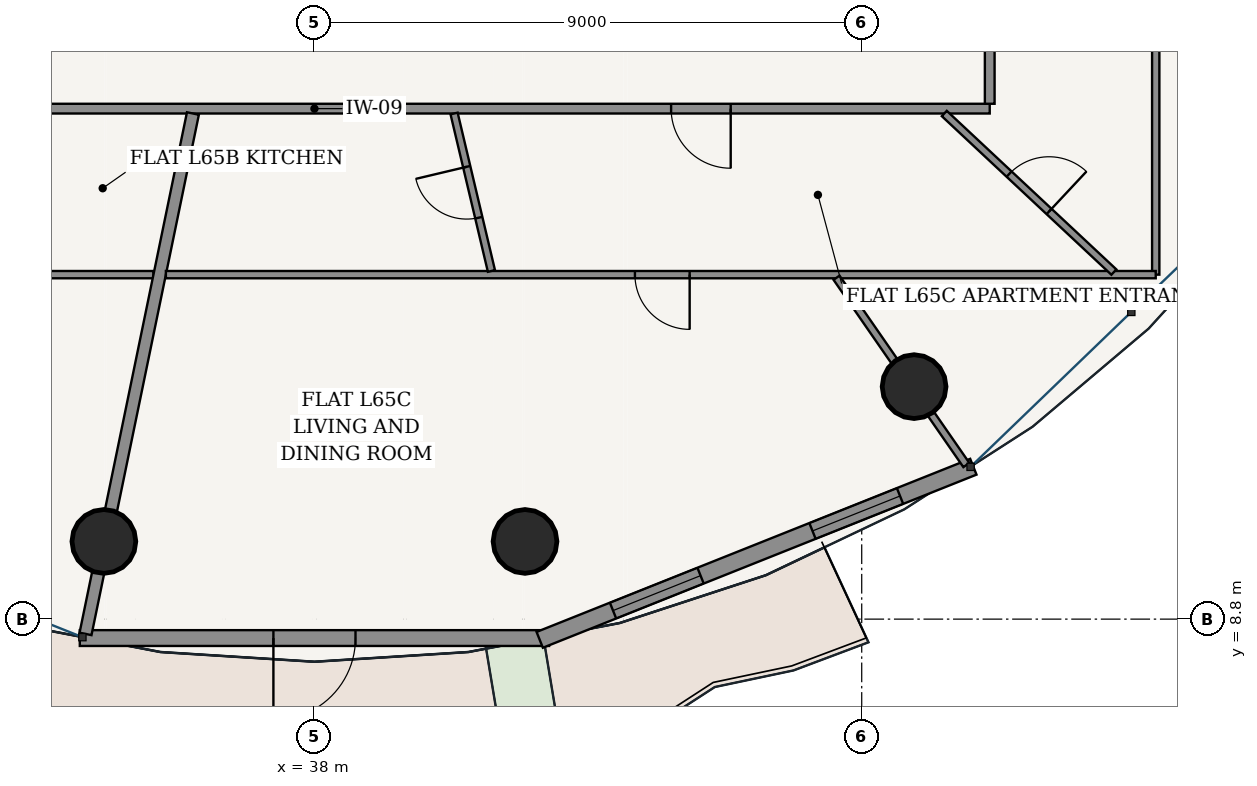
"""IFC4 building model, lengths in metres.
Left out: names, types, materials, properties, quantities, classifications, styles, units other than length and angle.
Written with IfcOpenShell. Run it as: python <this file> out.ifc"""

import sys

from ifc_helpers import new_model, si_unit, direction, frame, frame_2d, origin, origin_2d, place, context, subcontext, project, spatial, rectangle, hollow_circle, extrude, source, transform, mapped, element, fill, save


model = new_model("IFC4")
c1 = context("Model", 3, precision=1e-05, world=origin(), true_north=direction((-0.2419218956, 0.970295726276)))
c2 = subcontext(c1, "Body", "Model", "MODEL_VIEW")
j1 = project(units=[si_unit("LENGTHUNIT", "METRE"), si_unit("PLANEANGLEUNIT", "RADIAN")], contexts=[c1])
p1 = place(None, origin())
s1 = spatial("IfcSite", under=j1, at=p1, CompositionType="ELEMENT")
p2 = place(p1, origin())
s2 = spatial("IfcBuilding", under=s1, at=p2, CompositionType="ELEMENT")
p3 = place(p2, frame((0.0, 0.0, 248.2)))
s3 = spatial("IfcBuildingStorey", under=s2, at=p3, CompositionType="ELEMENT", Elevation=248.2)
for number, where, z_axis, x_axis in (
    (1, (34.537, 10.078, 0.0), (0.0, 0.0, 1.0), (1.0, 0.0, 0.0)),
    (2, (41.463, 10.078, 0.0), (0.0, 0.0, 1.0), (1.0, 0.0, 0.0)),
    (3, (47.861, 12.624, 0.0), (0.0, 0.0, 1.0), (1.0, 0.0, 0.0)),
):
    element("IfcColumn", number, at=place(p3, frame(where, z_axis=z_axis, x_axis=x_axis)), inside=s3, PredefinedType="COLUMN", context=c2, shape_type="SweptSolid", body=[
        extrude(hollow_circle(Radius=0.525, WallThickness=0.035, at=origin_2d()), origin(), (0.0, 0.0, 1.0), 3.75),
    ])
p4 = place(p3, frame((34.141, 8.489, 0.0), z_axis=(0.0, 0.0, 1.0), x_axis=(1.0, 0.0, 0.0)))
e4 = element("IfcWall", 4, at=p4, inside=s3, PredefinedType="SOLIDWALL", context=c2, shape_type="SweptSolid", body=[
    extrude(rectangle(XDim=7.718, YDim=0.26, at=frame_2d((3.859, 0.0))), origin(), (0.0, 0.0, 1.0), 3.49),
])
p5 = place(p4, frame((3.184, 0.0, 0.0)))
e5 = element("IfcOpeningElement", 5, at=p5, cuts=e4, PredefinedType="OPENING", context=c2, shape_type="SweptSolid", body=[
    extrude(rectangle(XDim=1.35, YDim=2.2, at=frame_2d((0.675, 1.1))), frame((0.0, 0.14, 0.0), z_axis=(0.0, -1.0, 0.0), x_axis=(1.0, 0.0, 0.0)), (0.0, 0.0, 1.0), 0.28),
])
p6 = place(p3, frame((41.705, 8.459, 0.0), z_axis=(0.0, 0.0, 1.0), x_axis=(0.92871332341, 0.370798547626, 0.0)))
e6 = element("IfcWall", 6, at=p6, inside=s3, PredefinedType="SOLIDWALL", context=c2, shape_type="SweptSolid", body=[
    extrude(rectangle(XDim=7.678, YDim=0.28, at=frame_2d((3.839, 0.0))), origin(), (0.0, 0.0, 1.0), 3.49),
])
p7 = place(p6, frame((1.298, 0.0, 0.85)))
e7 = element("IfcOpeningElement", 7, at=p7, cuts=e6, PredefinedType="OPENING", context=c2, shape_type="SweptSolid", body=[
    extrude(rectangle(XDim=1.55, YDim=1.95, at=frame_2d((0.775, 0.975))), frame((0.0, 0.15, 0.0), z_axis=(0.0, -1.0, 0.0), x_axis=(1.0, 0.0, 0.0)), (0.0, 0.0, 1.0), 0.3),
])
p8 = place(p6, frame((4.83, 0.0, 0.85)))
e8 = element("IfcOpeningElement", 8, at=p8, cuts=e6, PredefinedType="OPENING", context=c2, shape_type="SweptSolid", body=[
    extrude(rectangle(XDim=1.55, YDim=1.95, at=frame_2d((0.775, 0.975))), frame((0.0, 0.15, 0.0), z_axis=(0.0, -1.0, 0.0), x_axis=(1.0, 0.0, 0.0)), (0.0, 0.0, 1.0), 0.3),
])
p9 = place(p3, frame((26.895, 17.195, 0.0), z_axis=(0.0, 0.0, 1.0), x_axis=(1.0, 0.0, 0.0)))
e9 = element("IfcWall", 9, at=p9, inside=s3, PredefinedType="PARTITIONING", context=c2, shape_type="SweptSolid", body=[
    extrude(rectangle(XDim=22.21, YDim=0.16, at=frame_2d((11.105, 0.0))), origin(), (0.0, 0.0, 1.0), 3.015),
])
p10 = place(p9, frame((2.861, 0.0, 0.0)))
e10 = element("IfcOpeningElement", 10, at=p10, cuts=e9, PredefinedType="OPENING", context=c2, shape_type="SweptSolid", body=[
    extrude(rectangle(XDim=0.98, YDim=2.2, at=frame_2d((0.49, 1.1))), frame((0.0, 0.09, 0.0), z_axis=(0.0, -1.0, 0.0), x_axis=(1.0, 0.0, 0.0)), (0.0, 0.0, 1.0), 0.18),
])
p11 = place(p9, frame((16.97, 0.0, 0.0)))
e11 = element("IfcOpeningElement", 11, at=p11, cuts=e9, PredefinedType="OPENING", context=c2, shape_type="SweptSolid", body=[
    extrude(rectangle(XDim=0.98, YDim=2.2, at=frame_2d((0.49, 1.1))), frame((0.0, 0.09, 0.0), z_axis=(0.0, -1.0, 0.0), x_axis=(1.0, 0.0, 0.0)), (0.0, 0.0, 1.0), 0.18),
])
p12 = place(p3, frame((49.105, 17.275, 0.0), z_axis=(0.0, 0.0, 1.0), x_axis=(0.0, 1.0, 0.0)))
e12 = element("IfcWall", 12, at=p12, inside=s3, PredefinedType="PARTITIONING", context=c2, shape_type="SweptSolid", body=[
    extrude(rectangle(XDim=13.925, YDim=0.16, at=frame_2d((6.962, 0.0))), origin(), (0.0, 0.0, 1.0), 3.015),
])
p13 = place(p3, frame((35.353, 14.465, 0.0), z_axis=(0.0, 0.0, 1.0), x_axis=(-1.0, 0.0, 0.0)))
e13 = element("IfcWall", 13, at=p13, inside=s3, PredefinedType="PARTITIONING", context=c2, shape_type="SweptSolid", body=[
    extrude(rectangle(XDim=11.188, YDim=0.12, at=frame_2d((5.594, 0.0))), origin(), (0.0, 0.0, 1.0), 3.015),
])
p14 = place(p13, frame((2.049, 0.0, 0.0)))
e14 = element("IfcOpeningElement", 14, at=p14, cuts=e13, PredefinedType="OPENING", context=c2, shape_type="SweptSolid", body=[
    extrude(rectangle(XDim=0.9, YDim=2.15, at=frame_2d((0.45, 1.075))), frame((0.0, 0.07, 0.0), z_axis=(0.0, -1.0, 0.0), x_axis=(1.0, 0.0, 0.0)), (0.0, 0.0, 1.0), 0.14),
])
p15 = place(p3, frame((36.001, 17.115, 0.0), z_axis=(0.0, 0.0, 1.0), x_axis=(-0.202108543081, -0.979363128167, 0.0)))
e15 = element("IfcWall", 15, at=p15, inside=s3, PredefinedType="PARTITIONING", context=c2, shape_type="SweptSolid", body=[
    extrude(rectangle(XDim=8.739, YDim=0.2, at=frame_2d((4.369, 0.0))), origin(), (0.0, 0.0, 1.0), 3.015),
])
p16 = place(p3, frame((51.835, 21.174, 0.0), z_axis=(0.0, 0.0, 1.0), x_axis=(0.0, -1.0, 0.0)))
e16 = element("IfcWall", 16, at=p16, inside=s3, PredefinedType="PARTITIONING", context=c2, shape_type="SweptSolid", body=[
    extrude(rectangle(XDim=6.709, YDim=0.12, at=frame_2d((3.354, 0.0))), origin(), (0.0, 0.0, 1.0), 3.015),
])
p17 = place(p16, frame((1.888, 0.0, 0.0)))
e17 = element("IfcOpeningElement", 17, at=p17, cuts=e16, PredefinedType="OPENING", context=c2, shape_type="SweptSolid", body=[
    extrude(rectangle(XDim=0.9, YDim=2.15, at=frame_2d((0.45, 1.075))), frame((0.0, 0.07, 0.0), z_axis=(0.0, -1.0, 0.0), x_axis=(1.0, 0.0, 0.0)), (0.0, 0.0, 1.0), 0.14),
])
p18 = place(p3, frame((51.835, 14.465, 0.0), z_axis=(0.0, 0.0, 1.0), x_axis=(-1.0, 0.0, 0.0)))
e18 = element("IfcWall", 18, at=p18, inside=s3, PredefinedType="PARTITIONING", context=c2, shape_type="SweptSolid", body=[
    extrude(rectangle(XDim=16.278, YDim=0.12, at=frame_2d((8.139, 0.0))), origin(), (0.0, 0.0, 1.0), 3.015),
])
p19 = place(p18, frame((7.665, 0.0, 0.0)))
e19 = element("IfcOpeningElement", 19, at=p19, cuts=e18, PredefinedType="OPENING", context=c2, shape_type="SweptSolid", body=[
    extrude(rectangle(XDim=0.9, YDim=2.15, at=frame_2d((0.45, 1.075))), frame((0.0, 0.07, 0.0), z_axis=(0.0, -1.0, 0.0), x_axis=(1.0, 0.0, 0.0)), (0.0, 0.0, 1.0), 0.14),
])
p20 = place(p3, frame((46.586, 14.414, 0.0), z_axis=(0.0, 0.0, 1.0), x_axis=(0.569657021681, -0.821882520589, 0.0)))
e20 = element("IfcWall", 20, at=p20, inside=s3, PredefinedType="PARTITIONING", context=c2, shape_type="SweptSolid", body=[
    extrude(rectangle(XDim=3.748, YDim=0.12, at=frame_2d((1.874, 0.0))), origin(), (0.0, 0.0, 1.0), 3.015),
])
p21 = place(p3, frame((40.296, 17.115, 0.0), z_axis=(0.0, 0.0, 1.0), x_axis=(0.230710960444, -0.973022328999, 0.0)))
e21 = element("IfcWall", 21, at=p21, inside=s3, PredefinedType="PARTITIONING", context=c2, shape_type="SweptSolid", body=[
    extrude(rectangle(XDim=2.661, YDim=0.12, at=frame_2d((1.331, 0.0))), origin(), (0.0, 0.0, 1.0), 3.49),
])
p22 = place(p21, frame((0.901, 0.0, 0.0)))
e22 = element("IfcOpeningElement", 22, at=p22, cuts=e21, PredefinedType="OPENING", context=c2, shape_type="SweptSolid", body=[
    extrude(rectangle(XDim=0.86, YDim=2.15, at=frame_2d((0.43, 1.075))), frame((0.0, 0.07, 0.0), z_axis=(0.0, -1.0, 0.0), x_axis=(1.0, 0.0, 0.0)), (0.0, 0.0, 1.0), 0.14),
])
p23 = place(p3, frame((48.358, 17.115, 0.0), z_axis=(0.0, 0.0, 1.0), x_axis=(0.730431927487, -0.682985504464, 0.0)))
e23 = element("IfcWall", 23, at=p23, inside=s3, PredefinedType="PARTITIONING", context=c2, shape_type="SweptSolid", body=[
    extrude(rectangle(XDim=3.818, YDim=0.12, at=frame_2d((1.909, 0.0))), origin(), (0.0, 0.0, 1.0), 3.121),
])
p24 = place(p23, frame((1.459, 0.0, 0.0)))
e24 = element("IfcOpeningElement", 24, at=p24, cuts=e23, PredefinedType="OPENING", context=c2, shape_type="SweptSolid", body=[
    extrude(rectangle(XDim=0.9, YDim=2.15, at=frame_2d((0.45, 1.075))), frame((0.0, 0.07, 0.0), z_axis=(0.0, -1.0, 0.0), x_axis=(1.0, 0.0, 0.0)), (0.0, 0.0, 1.0), 0.14),
])
m1 = source(origin(), c2, "Body", "SweptSolid", [
    extrude(rectangle(XDim=1.35, YDim=2.2, at=frame_2d((0.675, 1.1))), frame((0.0, 0.025, 0.0), z_axis=(0.0, -1.0, 0.0), x_axis=(1.0, 0.0, 0.0)), (0.0, 0.0, 1.0), 0.05),
])
p25 = place(p5, frame((1.35, 0.0, 0.0), z_axis=(0.0, 0.0, 1.0), x_axis=(-1.0, 0.0, 0.0)))
e25 = element("IfcDoor", 25, at=p25, inside=s3, OperationType="SINGLE_SWING_RIGHT", PredefinedType="DOOR", context=c2, shape_type="MappedRepresentation", body=[
    mapped(m1, transform((0.0, 0.0, 0.0), scale=1.0)),
])
fill(e5, e25)
m2 = source(origin(), c2, "Body", "SweptSolid", [
    extrude(rectangle(XDim=1.55, YDim=1.95, at=frame_2d((0.775, 0.975))), frame((0.0, 0.03, 0.0), z_axis=(0.0, -1.0, 0.0), x_axis=(1.0, 0.0, 0.0)), (0.0, 0.0, 1.0), 0.06),
])
p26 = place(p7, origin())
e26 = element("IfcWindow", 26, at=p26, inside=s3, PartitioningType="SINGLE_PANEL", PredefinedType="WINDOW", context=c2, shape_type="MappedRepresentation", body=[
    mapped(m2, transform((0.0, 0.0, 0.0), scale=1.0)),
])
fill(e7, e26)
p27 = place(p8, origin())
e27 = element("IfcWindow", 27, at=p27, inside=s3, PartitioningType="SINGLE_PANEL", PredefinedType="WINDOW", context=c2, shape_type="MappedRepresentation", body=[
    mapped(m2, transform((0.0, 0.0, 0.0), scale=1.0)),
])
fill(e8, e27)
m3 = source(origin(), c2, "Body", "SweptSolid", [
    extrude(rectangle(XDim=0.98, YDim=2.2, at=frame_2d((0.49, 1.1))), frame((0.0, 0.025, 0.0), z_axis=(0.0, -1.0, 0.0), x_axis=(1.0, 0.0, 0.0)), (0.0, 0.0, 1.0), 0.05),
])
p28 = place(p11, frame((0.98, 0.0, 0.0), z_axis=(0.0, 0.0, 1.0), x_axis=(-1.0, 0.0, 0.0)))
e28 = element("IfcDoor", 28, at=p28, inside=s3, OperationType="SINGLE_SWING_LEFT", PredefinedType="DOOR", context=c2, shape_type="MappedRepresentation", body=[
    mapped(m3, transform((0.0, 0.0, 0.0), scale=1.0)),
])
fill(e11, e28)
m4 = source(origin(), c2, "Body", "SweptSolid", [
    extrude(rectangle(XDim=0.86, YDim=2.15, at=frame_2d((0.43, 1.075))), frame((0.0, 0.025, 0.0), z_axis=(0.0, -1.0, 0.0), x_axis=(1.0, 0.0, 0.0)), (0.0, 0.0, 1.0), 0.05),
])
p29 = place(p22, frame((0.86, 0.0, 0.0), z_axis=(0.0, 0.0, 1.0), x_axis=(-1.0, 0.0, 0.0)))
e29 = element("IfcDoor", 29, at=p29, inside=s3, OperationType="SINGLE_SWING_RIGHT", PredefinedType="DOOR", context=c2, shape_type="MappedRepresentation", body=[
    mapped(m4, transform((0.0, 0.0, 0.0), scale=1.0)),
])
fill(e22, e29)
m5 = source(origin(), c2, "Body", "SweptSolid", [
    extrude(rectangle(XDim=0.9, YDim=2.15, at=frame_2d((0.45, 1.075))), frame((0.0, 0.025, 0.0), z_axis=(0.0, -1.0, 0.0), x_axis=(1.0, 0.0, 0.0)), (0.0, 0.0, 1.0), 0.05),
])
p30 = place(p19, origin())
e30 = element("IfcDoor", 30, at=p30, inside=s3, OperationType="SINGLE_SWING_LEFT", PredefinedType="DOOR", context=c2, shape_type="MappedRepresentation", body=[
    mapped(m5, transform((0.0, 0.0, 0.0), scale=1.0)),
])
fill(e19, e30)
p31 = place(p24, origin())
e31 = element("IfcDoor", 31, at=p31, inside=s3, OperationType="SINGLE_SWING_RIGHT", PredefinedType="DOOR", context=c2, shape_type="MappedRepresentation", body=[
    mapped(m5, transform((0.0, 0.0, 0.0), scale=1.0)),
])
fill(e24, e31)
save(model, sys.argv[1])
